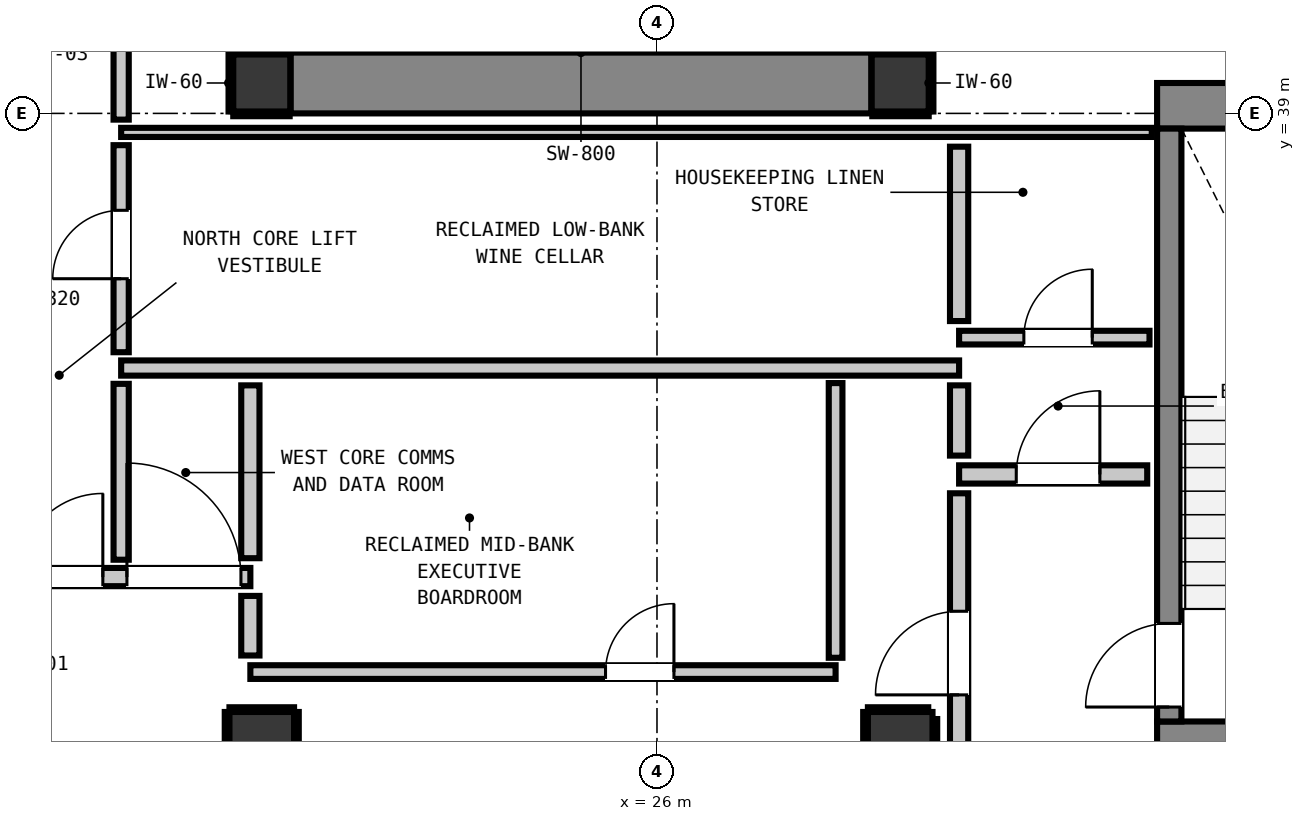
"""IFC4 building model, lengths in metres.
Left out: names, types, materials, properties, quantities, classifications, styles, units other than length and angle.
Written with IfcOpenShell. Run it as: python <this file> out.ifc"""

import sys

from ifc_helpers import new_model, si_unit, direction, frame, frame_2d, origin, origin_2d, place, context, subcontext, project, spatial, rectangle, extrude, element, fill, save


model = new_model("IFC4")
c1 = context("Model", 3, precision=1e-05, world=origin(), true_north=direction((0.0, 1.0)))
c2 = subcontext(c1, "Body", "Model", "MODEL_VIEW")
j1 = project(units=[si_unit("LENGTHUNIT", "METRE"), si_unit("PLANEANGLEUNIT", "RADIAN")], contexts=[c1])
p1 = place(None, origin())
s1 = spatial("IfcSite", under=j1, at=p1, CompositionType="ELEMENT")
p2 = place(p1, origin())
s2 = spatial("IfcBuilding", under=s1, at=p2, CompositionType="ELEMENT")
p3 = place(p2, frame((0.0, 0.0, 223.36)))
s3 = spatial("IfcBuildingStorey", under=s2, at=p3, CompositionType="ELEMENT", Elevation=223.36)
for number, where, z_axis, x_axis in (
    (1, (20.8, 39.4, 0.0), (0.0, 0.0, 1.0), (1.0, 0.0, 0.0)),
    (2, (29.2, 39.4, 0.0), (0.0, 0.0, 1.0), (1.0, 0.0, 0.0)),
):
    element("IfcColumn", number, at=place(p3, frame(where, z_axis=z_axis, x_axis=x_axis)), inside=s3, PredefinedType="COLUMN", context=c2, shape_type="SweptSolid", body=[
        extrude(rectangle(XDim=0.75, YDim=0.75, at=origin_2d()), origin(), (0.0, 0.0, 1.0), 3.32),
    ])
p4 = place(p3, frame((32.58, 39.1, 0.0), z_axis=(0.0, 0.0, 1.0), x_axis=(1.0, 0.0, 0.0)))
e3 = element("IfcWall", 3, at=p4, inside=s3, PredefinedType="SHEAR", context=c2, shape_type="SweptSolid", body=[
    extrude(rectangle(XDim=4.08, YDim=0.6, at=frame_2d((2.04, 0.0))), origin(), (0.0, 0.0, 1.0), 3.32),
])
p5 = place(p3, frame((32.58, 30.7, 0.0), z_axis=(0.0, 0.0, 1.0), x_axis=(1.0, 0.0, 0.0)))
e4 = element("IfcWall", 4, at=p5, inside=s3, PredefinedType="SHEAR", context=c2, shape_type="SweptSolid", body=[
    extrude(rectangle(XDim=3.54, YDim=0.6, at=frame_2d((1.77, 0.0))), origin(), (0.0, 0.0, 1.0), 3.32),
])
p6 = place(p3, frame((21.18, 39.4, 0.0), z_axis=(0.0, 0.0, 1.0), x_axis=(1.0, 0.0, 0.0)))
e5 = element("IfcWall", 5, at=p6, inside=s3, PredefinedType="SHEAR", context=c2, shape_type="SweptSolid", body=[
    extrude(rectangle(XDim=7.64, YDim=0.8, at=frame_2d((3.82, 0.0))), origin(), (0.0, 0.0, 1.0), 3.32),
])
p7 = place(p3, frame((32.74, 31.0, 0.0), z_axis=(0.0, 0.0, 1.0), x_axis=(0.0, 1.0, 0.0)))
e6 = element("IfcWall", 6, at=p7, inside=s3, PredefinedType="SHEAR", context=c2, shape_type="SweptSolid", body=[
    extrude(rectangle(XDim=7.8, YDim=0.32, at=frame_2d((3.9, 0.0))), origin(), (0.0, 0.0, 1.0), 3.32),
])
p8 = place(p7, frame((0.19, 0.0, 0.0)))
e7 = element("IfcOpeningElement", 7, at=p8, cuts=e6, PredefinedType="OPENING", context=c2, shape_type="SweptSolid", body=[
    extrude(rectangle(XDim=1.1, YDim=2.15, at=frame_2d((0.55, 1.075))), frame((0.0, 0.17, 0.0), z_axis=(0.0, -1.0, 0.0), x_axis=(1.0, 0.0, 0.0)), (0.0, 0.0, 1.0), 0.34),
])
for number, where, z_axis, x_axis in (
    (8, (20.8, 30.7, 0.0), (0.0, 0.0, 1.0), (1.0, 0.0, 0.0)),
    (9, (29.2, 30.7, 0.0), (0.0, 0.0, 1.0), (1.0, 0.0, 0.0)),
):
    element("IfcColumn", number, at=place(p3, frame(where, z_axis=z_axis, x_axis=x_axis)), inside=s3, PredefinedType="COLUMN", context=c2, shape_type="SweptSolid", body=[
        extrude(rectangle(XDim=0.85, YDim=0.85, at=origin_2d()), origin(), (0.0, 0.0, 1.0), 3.32),
    ])
p9 = place(p3, frame((17.45, 32.9, 0.0), z_axis=(0.0, 0.0, 1.0), x_axis=(1.0, 0.0, 0.0)))
e10 = element("IfcWall", 10, at=p9, inside=s3, PredefinedType="PARTITIONING", context=c2, shape_type="SweptSolid", body=[
    extrude(rectangle(XDim=3.2, YDim=0.24, at=frame_2d((1.6, 0.0))), origin(), (0.0, 0.0, 1.0), 2.92),
])
p10 = place(p9, frame((0.159, 0.0, 0.0)))
e11 = element("IfcOpeningElement", 11, at=p10, cuts=e10, PredefinedType="OPENING", context=c2, shape_type="SweptSolid", body=[
    extrude(rectangle(XDim=1.1, YDim=2.15, at=frame_2d((0.55, 1.075))), frame((0.0, 0.13, 0.0), z_axis=(0.0, -1.0, 0.0), x_axis=(1.0, 0.0, 0.0)), (0.0, 0.0, 1.0), 0.26),
])
p11 = place(p9, frame((1.576, 0.0, 0.0)))
e12 = element("IfcOpeningElement", 12, at=p11, cuts=e10, PredefinedType="OPENING", context=c2, shape_type="SweptSolid", body=[
    extrude(rectangle(XDim=1.5, YDim=2.15, at=frame_2d((0.75, 1.075))), frame((0.0, 0.13, 0.0), z_axis=(0.0, -1.0, 0.0), x_axis=(1.0, 0.0, 0.0)), (0.0, 0.0, 1.0), 0.26),
])
p12 = place(p3, frame((29.975, 34.25, 0.0), z_axis=(0.0, 0.0, 1.0), x_axis=(1.0, 0.0, 0.0)))
e13 = element("IfcWall", 13, at=p12, inside=s3, PredefinedType="PARTITIONING", context=c2, shape_type="SweptSolid", body=[
    extrude(rectangle(XDim=2.475, YDim=0.24, at=frame_2d((1.237, 0.0))), origin(), (0.0, 0.0, 1.0), 2.92),
])
p13 = place(p12, frame((0.752, 0.0, 0.0)))
e14 = element("IfcOpeningElement", 14, at=p13, cuts=e13, PredefinedType="OPENING", context=c2, shape_type="SweptSolid", body=[
    extrude(rectangle(XDim=1.1, YDim=2.15, at=frame_2d((0.55, 1.075))), frame((0.0, 0.13, 0.0), z_axis=(0.0, -1.0, 0.0), x_axis=(1.0, 0.0, 0.0)), (0.0, 0.0, 1.0), 0.26),
])
p14 = place(p3, frame((18.95, 35.65, 0.0), z_axis=(0.0, 0.0, 1.0), x_axis=(1.0, 0.0, 0.0)))
e15 = element("IfcWall", 15, at=p14, inside=s3, PredefinedType="PARTITIONING", context=c2, shape_type="SweptSolid", body=[
    extrude(rectangle(XDim=11.025, YDim=0.2, at=frame_2d((5.513, 0.0))), origin(), (0.0, 0.0, 1.0), 2.92),
])
p15 = place(p3, frame((20.65, 31.65, 0.0), z_axis=(0.0, 0.0, 1.0), x_axis=(1.0, 0.0, 0.0)))
e16 = element("IfcWall", 16, at=p15, inside=s3, PredefinedType="PARTITIONING", context=c2, shape_type="SweptSolid", body=[
    extrude(rectangle(XDim=7.7, YDim=0.18, at=frame_2d((3.85, 0.0))), origin(), (0.0, 0.0, 1.0), 2.92),
])
p16 = place(p15, frame((4.673, 0.0, 0.0)))
e17 = element("IfcOpeningElement", 17, at=p16, cuts=e16, PredefinedType="OPENING", context=c2, shape_type="SweptSolid", body=[
    extrude(rectangle(XDim=0.9, YDim=2.1, at=frame_2d((0.45, 1.05))), frame((0.0, 0.1, 0.0), z_axis=(0.0, -1.0, 0.0), x_axis=(1.0, 0.0, 0.0)), (0.0, 0.0, 1.0), 0.2),
])
p17 = place(p3, frame((29.975, 36.05, 0.0), z_axis=(0.0, 0.0, 1.0), x_axis=(1.0, 0.0, 0.0)))
e18 = element("IfcWall", 18, at=p17, inside=s3, PredefinedType="PARTITIONING", context=c2, shape_type="SweptSolid", body=[
    extrude(rectangle(XDim=2.505, YDim=0.18, at=frame_2d((1.252, 0.0))), origin(), (0.0, 0.0, 1.0), 2.92),
])
p18 = place(p17, frame((0.852, 0.0, 0.0)))
e19 = element("IfcOpeningElement", 19, at=p18, cuts=e18, PredefinedType="OPENING", context=c2, shape_type="SweptSolid", body=[
    extrude(rectangle(XDim=0.9, YDim=2.1, at=frame_2d((0.45, 1.05))), frame((0.0, 0.1, 0.0), z_axis=(0.0, -1.0, 0.0), x_axis=(1.0, 0.0, 0.0)), (0.0, 0.0, 1.0), 0.2),
])
p19 = place(p3, frame((18.95, 38.75, 0.0), z_axis=(0.0, 0.0, 1.0), x_axis=(1.0, 0.0, 0.0)))
e20 = element("IfcWall", 20, at=p19, inside=s3, PredefinedType="PARTITIONING", context=c2, shape_type="SweptSolid", body=[
    extrude(rectangle(XDim=13.56, YDim=0.12, at=frame_2d((6.78, 0.0))), origin(), (0.0, 0.0, 1.0), 2.92),
])
p20 = place(p3, frame((20.65, 31.868, 0.0), z_axis=(0.0, 0.0, 1.0), x_axis=(0.0, 1.0, 0.0)))
e21 = element("IfcWall", 21, at=p20, inside=s3, PredefinedType="PARTITIONING", context=c2, shape_type="SweptSolid", body=[
    extrude(rectangle(XDim=0.784, YDim=0.24, at=frame_2d((0.392, 0.0))), origin(), (0.0, 0.0, 1.0), 1.849),
])
p21 = place(p3, frame((20.65, 33.148, 0.0), z_axis=(0.0, 0.0, 1.0), x_axis=(0.0, 1.0, 0.0)))
e22 = element("IfcWall", 22, at=p21, inside=s3, PredefinedType="PARTITIONING", context=c2, shape_type="SweptSolid", body=[
    extrude(rectangle(XDim=2.274, YDim=0.24, at=frame_2d((1.137, 0.0))), origin(), (0.0, 0.0, 1.0), 1.849),
])
p22 = place(p3, frame((29.975, 29.768, 0.0), z_axis=(0.0, 0.0, 1.0), x_axis=(0.0, 1.0, 0.0)))
e23 = element("IfcWall", 23, at=p22, inside=s3, PredefinedType="PARTITIONING", context=c2, shape_type="SweptSolid", body=[
    extrude(rectangle(XDim=4.234, YDim=0.24, at=frame_2d((2.117, 0.0))), origin(), (0.0, 0.0, 1.0), 2.92),
])
p23 = place(p22, frame((1.582, 0.0, 0.0)))
e24 = element("IfcOpeningElement", 24, at=p23, cuts=e23, PredefinedType="OPENING", context=c2, shape_type="SweptSolid", body=[
    extrude(rectangle(XDim=1.1, YDim=2.15, at=frame_2d((0.55, 1.075))), frame((0.0, 0.13, 0.0), z_axis=(0.0, -1.0, 0.0), x_axis=(1.0, 0.0, 0.0)), (0.0, 0.0, 1.0), 0.26),
])
p24 = place(p3, frame((29.975, 34.498, 0.0), z_axis=(0.0, 0.0, 1.0), x_axis=(0.0, 1.0, 0.0)))
e25 = element("IfcWall", 25, at=p24, inside=s3, PredefinedType="PARTITIONING", context=c2, shape_type="SweptSolid", body=[
    extrude(rectangle(XDim=0.924, YDim=0.24, at=frame_2d((0.462, 0.0))), origin(), (0.0, 0.0, 1.0), 2.92),
])
p25 = place(p3, frame((29.975, 36.268, 0.0), z_axis=(0.0, 0.0, 1.0), x_axis=(0.0, 1.0, 0.0)))
e26 = element("IfcWall", 26, at=p25, inside=s3, PredefinedType="PARTITIONING", context=c2, shape_type="SweptSolid", body=[
    extrude(rectangle(XDim=2.294, YDim=0.24, at=frame_2d((1.147, 0.0))), origin(), (0.0, 0.0, 1.0), 2.92),
])
p26 = place(p3, frame((18.95, 33.128, 0.0), z_axis=(0.0, 0.0, 1.0), x_axis=(0.0, 1.0, 0.0)))
e27 = element("IfcWall", 27, at=p26, inside=s3, PredefinedType="PARTITIONING", context=c2, shape_type="SweptSolid", body=[
    extrude(rectangle(XDim=2.314, YDim=0.2, at=frame_2d((1.157, 0.0))), origin(), (0.0, 0.0, 1.0), 2.92),
])
p27 = place(p3, frame((18.95, 35.858, 0.0), z_axis=(0.0, 0.0, 1.0), x_axis=(0.0, 1.0, 0.0)))
e28 = element("IfcWall", 28, at=p27, inside=s3, PredefinedType="PARTITIONING", context=c2, shape_type="SweptSolid", body=[
    extrude(rectangle(XDim=2.724, YDim=0.2, at=frame_2d((1.362, 0.0))), origin(), (0.0, 0.0, 1.0), 2.92),
])
p28 = place(p27, frame((0.967, 0.0, 0.0)))
e29 = element("IfcOpeningElement", 29, at=p28, cuts=e28, PredefinedType="OPENING", context=c2, shape_type="SweptSolid", body=[
    extrude(rectangle(XDim=0.9, YDim=2.1, at=frame_2d((0.45, 1.05))), frame((0.0, 0.11, 0.0), z_axis=(0.0, -1.0, 0.0), x_axis=(1.0, 0.0, 0.0)), (0.0, 0.0, 1.0), 0.22),
])
p29 = place(p3, frame((18.95, 38.918, 0.0), z_axis=(0.0, 0.0, 1.0), x_axis=(0.0, 1.0, 0.0)))
e30 = element("IfcWall", 30, at=p29, inside=s3, PredefinedType="PARTITIONING", context=c2, shape_type="SweptSolid", body=[
    extrude(rectangle(XDim=1.134, YDim=0.2, at=frame_2d((0.567, 0.0))), origin(), (0.0, 0.0, 1.0), 2.92),
])
p30 = place(p3, frame((28.35, 31.838, 0.0), z_axis=(0.0, 0.0, 1.0), x_axis=(0.0, 1.0, 0.0)))
e31 = element("IfcWall", 31, at=p30, inside=s3, PredefinedType="PARTITIONING", context=c2, shape_type="SweptSolid", body=[
    extrude(rectangle(XDim=3.614, YDim=0.18, at=frame_2d((1.807, 0.0))), origin(), (0.0, 0.0, 1.0), 2.92),
])
for number, where, z_axis, x_axis in (
    (32, (20.425, 38.993, 0.0), (0.0, 0.0, 1.0), (1.0, 0.0, 0.0)),
    (33, (20.425, 39.807, 0.0), (0.0, 0.0, 1.0), (1.0, 0.0, 0.0)),
):
    element("IfcWall", number, at=place(p3, frame(where, z_axis=z_axis, x_axis=x_axis)), inside=s3, PredefinedType="PARTITIONING", context=c2, shape_type="SweptSolid", body=[
        extrude(rectangle(XDim=0.742, YDim=0.06, at=frame_2d((0.371, 0.0))), origin(), (0.0, 0.0, 1.0), 1.45),
    ])
p31 = place(p3, frame((20.393, 39.025, 0.0), z_axis=(0.0, 0.0, 1.0), x_axis=(0.0, 1.0, 0.0)))
e34 = element("IfcWall", 34, at=p31, inside=s3, PredefinedType="PARTITIONING", context=c2, shape_type="SweptSolid", body=[
    extrude(rectangle(XDim=0.75, YDim=0.06, at=frame_2d((0.375, 0.0))), origin(), (0.0, 0.0, 1.0), 1.45),
])
for number, where, z_axis, x_axis in (
    (35, (28.833, 38.993, 0.0), (0.0, 0.0, 1.0), (1.0, 0.0, 0.0)),
    (36, (28.833, 39.807, 0.0), (0.0, 0.0, 1.0), (1.0, 0.0, 0.0)),
):
    element("IfcWall", number, at=place(p3, frame(where, z_axis=z_axis, x_axis=x_axis)), inside=s3, PredefinedType="PARTITIONING", context=c2, shape_type="SweptSolid", body=[
        extrude(rectangle(XDim=0.742, YDim=0.06, at=frame_2d((0.371, 0.0))), origin(), (0.0, 0.0, 1.0), 1.45),
    ])
p32 = place(p3, frame((29.607, 39.025, 0.0), z_axis=(0.0, 0.0, 1.0), x_axis=(0.0, 1.0, 0.0)))
e37 = element("IfcWall", 37, at=p32, inside=s3, PredefinedType="PARTITIONING", context=c2, shape_type="SweptSolid", body=[
    extrude(rectangle(XDim=0.75, YDim=0.06, at=frame_2d((0.375, 0.0))), origin(), (0.0, 0.0, 1.0), 1.45),
])
for number, where, z_axis, x_axis in (
    (38, (20.375, 31.157, 0.0), (0.0, 0.0, 1.0), (1.0, 0.0, 0.0)),
    (39, (20.343, 30.275, 0.0), (0.0, 0.0, 1.0), (0.0, 1.0, 0.0)),
    (40, (21.257, 30.275, 0.0), (0.0, 0.0, 1.0), (0.0, 1.0, 0.0)),
):
    element("IfcWall", number, at=place(p3, frame(where, z_axis=z_axis, x_axis=x_axis)), inside=s3, PredefinedType="PARTITIONING", context=c2, shape_type="SweptSolid", body=[
        extrude(rectangle(XDim=0.85, YDim=0.06, at=frame_2d((0.425, 0.0))), origin(), (0.0, 0.0, 1.0), 1.45),
    ])
p33 = place(p3, frame((28.775, 31.157, 0.0), z_axis=(0.0, 0.0, 1.0), x_axis=(1.0, 0.0, 0.0)))
e41 = element("IfcWall", 41, at=p33, inside=s3, PredefinedType="PARTITIONING", context=c2, shape_type="SweptSolid", body=[
    extrude(rectangle(XDim=0.794, YDim=0.06, at=frame_2d((0.397, 0.0))), origin(), (0.0, 0.0, 1.0), 1.45),
])
p34 = place(p3, frame((28.743, 30.275, 0.0), z_axis=(0.0, 0.0, 1.0), x_axis=(0.0, 1.0, 0.0)))
e42 = element("IfcWall", 42, at=p34, inside=s3, PredefinedType="PARTITIONING", context=c2, shape_type="SweptSolid", body=[
    extrude(rectangle(XDim=0.85, YDim=0.06, at=frame_2d((0.425, 0.0))), origin(), (0.0, 0.0, 1.0), 1.45),
])
p35 = place(p3, frame((29.657, 30.275, 0.0), z_axis=(0.0, 0.0, 1.0), x_axis=(0.0, 1.0, 0.0)))
e43 = element("IfcWall", 43, at=p35, inside=s3, PredefinedType="PARTITIONING", context=c2, shape_type="SweptSolid", body=[
    extrude(rectangle(XDim=0.757, YDim=0.06, at=frame_2d((0.378, 0.0))), origin(), (0.0, 0.0, 1.0), 1.45),
])
p36 = place(p8, origin())
e44 = element("IfcDoor", 44, at=p36, inside=s3, OperationType="SINGLE_SWING_LEFT", PredefinedType="DOOR", context=c2, shape_type="SweptSolid", body=[
    extrude(rectangle(XDim=1.1, YDim=2.15, at=frame_2d((0.55, 1.075))), frame((0.0, 0.025, 0.0), z_axis=(0.0, -1.0, 0.0), x_axis=(1.0, 0.0, 0.0)), (0.0, 0.0, 1.0), 0.05),
])
fill(e7, e44)
p37 = place(p10, origin())
e45 = element("IfcDoor", 45, at=p37, inside=s3, OperationType="SINGLE_SWING_RIGHT", PredefinedType="DOOR", context=c2, shape_type="SweptSolid", body=[
    extrude(rectangle(XDim=1.1, YDim=2.15, at=frame_2d((0.55, 1.075))), frame((0.0, 0.025, 0.0), z_axis=(0.0, -1.0, 0.0), x_axis=(1.0, 0.0, 0.0)), (0.0, 0.0, 1.0), 0.05),
])
fill(e11, e45)
p38 = place(p23, origin())
e46 = element("IfcDoor", 46, at=p38, inside=s3, OperationType="SINGLE_SWING_LEFT", PredefinedType="DOOR", context=c2, shape_type="SweptSolid", body=[
    extrude(rectangle(XDim=1.1, YDim=2.15, at=frame_2d((0.55, 1.075))), frame((0.0, 0.025, 0.0), z_axis=(0.0, -1.0, 0.0), x_axis=(1.0, 0.0, 0.0)), (0.0, 0.0, 1.0), 0.05),
])
fill(e24, e46)
p39 = place(p13, origin())
e47 = element("IfcDoor", 47, at=p39, inside=s3, OperationType="SINGLE_SWING_RIGHT", PredefinedType="DOOR", context=c2, shape_type="SweptSolid", body=[
    extrude(rectangle(XDim=1.1, YDim=2.15, at=frame_2d((0.55, 1.075))), frame((0.0, 0.025, 0.0), z_axis=(0.0, -1.0, 0.0), x_axis=(1.0, 0.0, 0.0)), (0.0, 0.0, 1.0), 0.05),
])
fill(e14, e47)
p40 = place(p11, origin())
e48 = element("IfcDoor", 48, at=p40, inside=s3, OperationType="SINGLE_SWING_LEFT", PredefinedType="DOOR", context=c2, shape_type="SweptSolid", body=[
    extrude(rectangle(XDim=1.5, YDim=2.15, at=frame_2d((0.75, 1.075))), frame((0.0, 0.025, 0.0), z_axis=(0.0, -1.0, 0.0), x_axis=(1.0, 0.0, 0.0)), (0.0, 0.0, 1.0), 0.05),
])
fill(e12, e48)
p41 = place(p18, origin())
e49 = element("IfcDoor", 49, at=p41, inside=s3, OperationType="SINGLE_SWING_RIGHT", PredefinedType="DOOR", context=c2, shape_type="SweptSolid", body=[
    extrude(rectangle(XDim=0.9, YDim=2.1, at=frame_2d((0.45, 1.05))), frame((0.0, 0.025, 0.0), z_axis=(0.0, -1.0, 0.0), x_axis=(1.0, 0.0, 0.0)), (0.0, 0.0, 1.0), 0.05),
])
fill(e19, e49)
p42 = place(p28, origin())
e50 = element("IfcDoor", 50, at=p42, inside=s3, OperationType="SINGLE_SWING_LEFT", PredefinedType="DOOR", context=c2, shape_type="SweptSolid", body=[
    extrude(rectangle(XDim=0.9, YDim=2.1, at=frame_2d((0.45, 1.05))), frame((0.0, 0.025, 0.0), z_axis=(0.0, -1.0, 0.0), x_axis=(1.0, 0.0, 0.0)), (0.0, 0.0, 1.0), 0.05),
])
fill(e29, e50)
p43 = place(p16, origin())
e51 = element("IfcDoor", 51, at=p43, inside=s3, OperationType="SINGLE_SWING_RIGHT", PredefinedType="DOOR", context=c2, shape_type="SweptSolid", body=[
    extrude(rectangle(XDim=0.9, YDim=2.1, at=frame_2d((0.45, 1.05))), frame((0.0, 0.025, 0.0), z_axis=(0.0, -1.0, 0.0), x_axis=(1.0, 0.0, 0.0)), (0.0, 0.0, 1.0), 0.05),
])
fill(e17, e51)
save(model, sys.argv[1])
